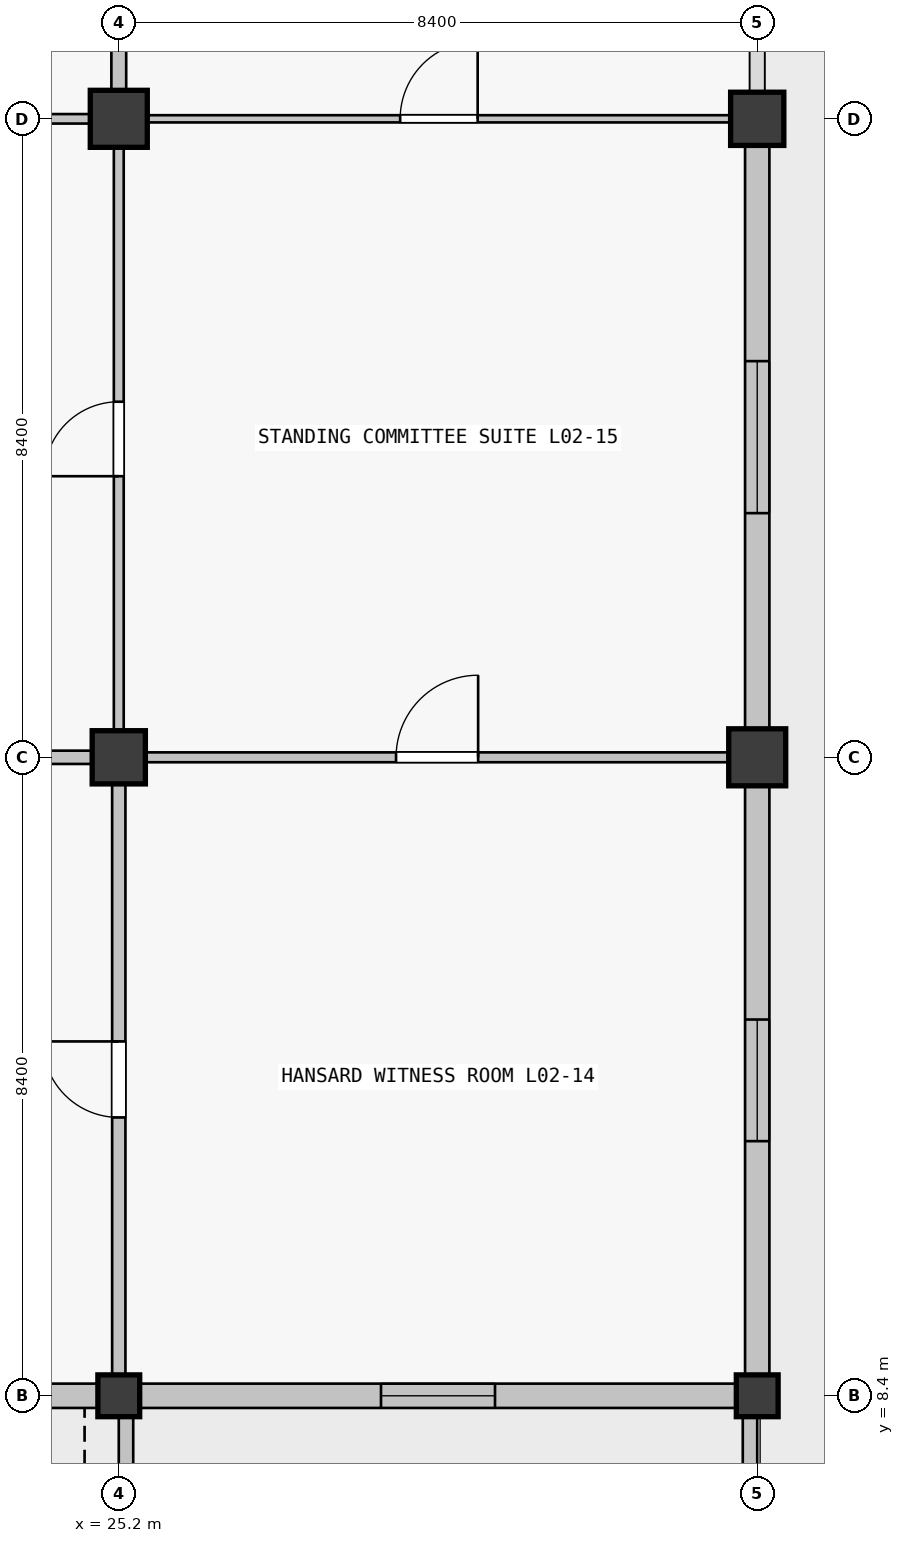
"""IFC4 building model, lengths in metres.
Left out: names, types, materials, properties, quantities, classifications, styles, units other than length and angle.
Written with IfcOpenShell. Run it as: python <this file> out.ifc"""

import sys

from ifc_helpers import new_model, si_unit, direction, frame, frame_2d, origin, origin_2d, place, context, subcontext, project, spatial, rectangle, extrude, element, fill, save


model = new_model("IFC4")
c1 = context("Model", 3, precision=1e-05, world=origin(), true_north=direction((0.0, 1.0)))
c2 = subcontext(c1, "Body", "Model", "MODEL_VIEW")
j1 = project(units=[si_unit("LENGTHUNIT", "METRE"), si_unit("PLANEANGLEUNIT", "RADIAN")], contexts=[c1])
p1 = place(None, origin())
s1 = spatial("IfcSite", under=j1, at=p1, CompositionType="ELEMENT")
p2 = place(p1, origin())
s2 = spatial("IfcBuilding", under=s1, at=p2, CompositionType="ELEMENT")
p3 = place(p2, frame((0.0, 0.0, 10.26)))
s3 = spatial("IfcBuildingStorey", under=s2, at=p3, CompositionType="ELEMENT", Elevation=10.26)
p4 = place(p3, frame((25.2, 8.4, 0.0), z_axis=(0.0, 0.0, 1.0), x_axis=(1.0, 0.0, 0.0)))
e1 = element("IfcColumn", 1, at=p4, inside=s3, PredefinedType="COLUMN", context=c2, shape_type="SweptSolid", body=[
    extrude(rectangle(XDim=0.55, YDim=0.55, at=origin_2d()), origin(), (0.0, 0.0, 1.0), 4.25),
])
p5 = place(p3, frame((25.2, 16.8, 0.0), z_axis=(0.0, 0.0, 1.0), x_axis=(1.0, 0.0, 0.0)))
e2 = element("IfcColumn", 2, at=p5, inside=s3, PredefinedType="COLUMN", context=c2, shape_type="SweptSolid", body=[
    extrude(rectangle(XDim=0.7, YDim=0.7, at=origin_2d()), origin(), (0.0, 0.0, 1.0), 4.5),
])
p6 = place(p3, frame((25.2, 25.2, 0.0), z_axis=(0.0, 0.0, 1.0), x_axis=(1.0, 0.0, 0.0)))
e3 = element("IfcColumn", 3, at=p6, inside=s3, PredefinedType="COLUMN", context=c2, shape_type="SweptSolid", body=[
    extrude(rectangle(XDim=0.75, YDim=0.75, at=origin_2d()), origin(), (0.0, 0.0, 1.0), 4.5),
])
p7 = place(p3, frame((33.6, 8.4, 0.0), z_axis=(0.0, 0.0, 1.0), x_axis=(1.0, 0.0, 0.0)))
e4 = element("IfcColumn", 4, at=p7, inside=s3, PredefinedType="COLUMN", context=c2, shape_type="SweptSolid", body=[
    extrude(rectangle(XDim=0.55, YDim=0.55, at=origin_2d()), origin(), (0.0, 0.0, 1.0), 4.25),
])
p8 = place(p3, frame((33.6, 16.8, 0.0), z_axis=(0.0, 0.0, 1.0), x_axis=(1.0, 0.0, 0.0)))
e5 = element("IfcColumn", 5, at=p8, inside=s3, PredefinedType="COLUMN", context=c2, shape_type="SweptSolid", body=[
    extrude(rectangle(XDim=0.75, YDim=0.75, at=origin_2d()), origin(), (0.0, 0.0, 1.0), 4.5),
])
p9 = place(p3, frame((33.6, 25.2, 0.0), z_axis=(0.0, 0.0, 1.0), x_axis=(1.0, 0.0, 0.0)))
e6 = element("IfcColumn", 6, at=p9, inside=s3, PredefinedType="COLUMN", context=c2, shape_type="SweptSolid", body=[
    extrude(rectangle(XDim=0.7, YDim=0.7, at=origin_2d()), origin(), (0.0, 0.0, 1.0), 4.5),
])
p10 = place(p3, frame((24.924, 8.4, 0.0), z_axis=(0.0, 0.0, 1.0), x_axis=(-1.0, 0.0, 0.0)))
e7 = element("IfcWall", 7, at=p10, inside=s3, PredefinedType="SOLIDWALL", context=c2, shape_type="SweptSolid", body=[
    extrude(rectangle(XDim=7.848, YDim=0.32, at=frame_2d((3.924, 0.0))), origin(), (0.0, 0.0, 1.0), 3.54),
])
p11 = place(p10, frame((3.099, 0.0, 0.0)))
e8 = element("IfcOpeningElement", 8, at=p11, cuts=e7, PredefinedType="OPENING", context=c2, shape_type="SweptSolid", body=[
    extrude(rectangle(XDim=1.65, YDim=2.2, at=frame_2d((0.825, 1.1))), frame((0.0, 0.16, 0.0), z_axis=(0.0, -1.0, 0.0), x_axis=(1.0, 0.0, 0.0)), (0.0, 0.0, 1.0), 0.32),
])
p12 = place(p3, frame((33.324, 8.4, 0.0), z_axis=(0.0, 0.0, 1.0), x_axis=(-1.0, 0.0, 0.0)))
e9 = element("IfcWall", 9, at=p12, inside=s3, PredefinedType="SOLIDWALL", context=c2, shape_type="SweptSolid", body=[
    extrude(rectangle(XDim=7.848, YDim=0.32, at=frame_2d((3.924, 0.0))), origin(), (0.0, 0.0, 1.0), 3.54),
])
p13 = place(p12, frame((3.174, 0.0, 0.9)))
e10 = element("IfcOpeningElement", 10, at=p13, cuts=e9, PredefinedType="OPENING", context=c2, shape_type="SweptSolid", body=[
    extrude(rectangle(XDim=1.5, YDim=1.8, at=frame_2d((0.75, 0.9))), frame((0.0, 0.16, 0.0), z_axis=(0.0, -1.0, 0.0), x_axis=(1.0, 0.0, 0.0)), (0.0, 0.0, 1.0), 0.32),
])
p14 = place(p3, frame((33.6, 16.424, 0.0), z_axis=(0.0, 0.0, 1.0), x_axis=(0.0, -1.0, 0.0)))
e11 = element("IfcWall", 11, at=p14, inside=s3, PredefinedType="SOLIDWALL", context=c2, shape_type="SweptSolid", body=[
    extrude(rectangle(XDim=7.748, YDim=0.32, at=frame_2d((3.874, 0.0))), origin(), (0.0, 0.0, 1.0), 3.54),
])
p15 = place(p14, frame((3.074, 0.0, 0.9)))
e12 = element("IfcOpeningElement", 12, at=p15, cuts=e11, PredefinedType="OPENING", context=c2, shape_type="SweptSolid", body=[
    extrude(rectangle(XDim=1.6, YDim=2.1, at=frame_2d((0.8, 1.05))), frame((0.0, 0.16, 0.0), z_axis=(0.0, -1.0, 0.0), x_axis=(1.0, 0.0, 0.0)), (0.0, 0.0, 1.0), 0.32),
])
p16 = place(p3, frame((33.6, 24.849, 0.0), z_axis=(0.0, 0.0, 1.0), x_axis=(0.0, -1.0, 0.0)))
e13 = element("IfcWall", 13, at=p16, inside=s3, PredefinedType="SOLIDWALL", context=c2, shape_type="SweptSolid", body=[
    extrude(rectangle(XDim=7.673, YDim=0.32, at=frame_2d((3.836, 0.0))), origin(), (0.0, 0.0, 1.0), 3.54),
])
p17 = place(p16, frame((2.837, 0.0, 0.9)))
e14 = element("IfcOpeningElement", 14, at=p17, cuts=e13, PredefinedType="OPENING", context=c2, shape_type="SweptSolid", body=[
    extrude(rectangle(XDim=2.0, YDim=2.1, at=frame_2d((1.0, 1.05))), frame((0.0, 0.16, 0.0), z_axis=(0.0, -1.0, 0.0), x_axis=(1.0, 0.0, 0.0)), (0.0, 0.0, 1.0), 0.32),
])
for number, where, z_axis, x_axis in (
    (15, (25.295, 0.26, 0.0), (0.0, 0.0, 1.0), (0.0, 1.0, 0.0)),
    (16, (33.505, 8.14, 0.0), (0.0, 0.0, 1.0), (0.0, -1.0, 0.0)),
):
    element("IfcWall", number, at=place(p3, frame(where, z_axis=z_axis, x_axis=x_axis)), inside=s3, PredefinedType="PARAPET", context=c2, shape_type="SweptSolid", body=[
        extrude(rectangle(XDim=7.88, YDim=0.19, at=frame_2d((3.94, 0.0))), origin(), (0.0, 0.0, 1.0), 0.95),
    ])
p18 = place(p3, frame((17.177, 16.8, 0.0), z_axis=(0.0, 0.0, 1.0), x_axis=(1.0, 0.0, 0.0)))
e17 = element("IfcWall", 17, at=p18, inside=s3, PredefinedType="PARTITIONING", context=c2, shape_type="SweptSolid", body=[
    extrude(rectangle(XDim=7.671, YDim=0.175, at=frame_2d((3.835, 0.0))), origin(), (0.0, 0.0, 1.0), 3.37),
])
p19 = place(p18, frame((3.371, 0.0, 0.0)))
e18 = element("IfcOpeningElement", 18, at=p19, cuts=e17, PredefinedType="OPENING", context=c2, shape_type="SweptSolid", body=[
    extrude(rectangle(XDim=0.93, YDim=2.12, at=frame_2d((0.465, 1.06))), frame((0.0, 0.087, 0.0), z_axis=(0.0, -1.0, 0.0), x_axis=(1.0, 0.0, 0.0)), (0.0, 0.0, 1.0), 0.175),
])
p20 = place(p3, frame((17.152, 25.2, 0.0), z_axis=(0.0, 0.0, 1.0), x_axis=(1.0, 0.0, 0.0)))
e19 = element("IfcWall", 19, at=p20, inside=s3, PredefinedType="PARTITIONING", context=c2, shape_type="SweptSolid", body=[
    extrude(rectangle(XDim=7.671, YDim=0.125, at=frame_2d((3.835, 0.0))), origin(), (0.0, 0.0, 1.0), 3.37),
])
p21 = place(p20, frame((3.306, 0.0, 0.0)))
e20 = element("IfcOpeningElement", 20, at=p21, cuts=e19, PredefinedType="OPENING", context=c2, shape_type="SweptSolid", body=[
    extrude(rectangle(XDim=1.06, YDim=2.25, at=frame_2d((0.53, 1.125))), frame((0.0, 0.062, 0.0), z_axis=(0.0, -1.0, 0.0), x_axis=(1.0, 0.0, 0.0)), (0.0, 0.0, 1.0), 0.125),
])
p22 = place(p3, frame((25.552, 16.8, 0.0), z_axis=(0.0, 0.0, 1.0), x_axis=(1.0, 0.0, 0.0)))
e21 = element("IfcWall", 21, at=p22, inside=s3, PredefinedType="MOVABLE", context=c2, shape_type="SweptSolid", body=[
    extrude(rectangle(XDim=7.671, YDim=0.13, at=frame_2d((3.835, 0.0))), origin(), (0.0, 0.0, 1.0), 3.37),
])
p23 = place(p22, frame((3.296, 0.0, 0.0)))
e22 = element("IfcOpeningElement", 22, at=p23, cuts=e21, PredefinedType="OPENING", context=c2, shape_type="SweptSolid", body=[
    extrude(rectangle(XDim=1.08, YDim=2.25, at=frame_2d((0.54, 1.125))), frame((0.0, 0.065, 0.0), z_axis=(0.0, -1.0, 0.0), x_axis=(1.0, 0.0, 0.0)), (0.0, 0.0, 1.0), 0.13),
])
p24 = place(p3, frame((25.577, 25.2, 0.0), z_axis=(0.0, 0.0, 1.0), x_axis=(1.0, 0.0, 0.0)))
e23 = element("IfcWall", 23, at=p24, inside=s3, PredefinedType="PARTITIONING", context=c2, shape_type="SweptSolid", body=[
    extrude(rectangle(XDim=7.671, YDim=0.095, at=frame_2d((3.835, 0.0))), origin(), (0.0, 0.0, 1.0), 3.37),
])
p25 = place(p24, frame((3.325, 0.0, 0.0)))
e24 = element("IfcOpeningElement", 24, at=p25, cuts=e23, PredefinedType="OPENING", context=c2, shape_type="SweptSolid", body=[
    extrude(rectangle(XDim=1.02, YDim=2.2, at=frame_2d((0.51, 1.1))), frame((0.0, 0.047, 0.0), z_axis=(0.0, -1.0, 0.0), x_axis=(1.0, 0.0, 0.0)), (0.0, 0.0, 1.0), 0.095),
])
p26 = place(p3, frame((25.2, 8.677, 0.0), z_axis=(0.0, 0.0, 1.0), x_axis=(0.0, 1.0, 0.0)))
e25 = element("IfcWall", 25, at=p26, inside=s3, PredefinedType="PARTITIONING", context=c2, shape_type="SweptSolid", body=[
    extrude(rectangle(XDim=7.771, YDim=0.175, at=frame_2d((3.885, 0.0))), origin(), (0.0, 0.0, 1.0), 3.37),
])
p27 = place(p26, frame((3.385, 0.0, 0.0)))
e26 = element("IfcOpeningElement", 26, at=p27, cuts=e25, PredefinedType="OPENING", context=c2, shape_type="SweptSolid", body=[
    extrude(rectangle(XDim=1.0, YDim=2.2, at=frame_2d((0.5, 1.1))), frame((0.0, 0.087, 0.0), z_axis=(0.0, -1.0, 0.0), x_axis=(1.0, 0.0, 0.0)), (0.0, 0.0, 1.0), 0.175),
])
p28 = place(p3, frame((25.2, 17.152, 0.0), z_axis=(0.0, 0.0, 1.0), x_axis=(0.0, 1.0, 0.0)))
e27 = element("IfcWall", 27, at=p28, inside=s3, PredefinedType="MOVABLE", context=c2, shape_type="SweptSolid", body=[
    extrude(rectangle(XDim=7.671, YDim=0.13, at=frame_2d((3.835, 0.0))), origin(), (0.0, 0.0, 1.0), 3.37),
])
p29 = place(p28, frame((3.346, 0.0, 0.0)))
e28 = element("IfcOpeningElement", 28, at=p29, cuts=e27, PredefinedType="OPENING", context=c2, shape_type="SweptSolid", body=[
    extrude(rectangle(XDim=0.98, YDim=2.18, at=frame_2d((0.49, 1.09))), frame((0.0, 0.065, 0.0), z_axis=(0.0, -1.0, 0.0), x_axis=(1.0, 0.0, 0.0)), (0.0, 0.0, 1.0), 0.13),
])
p30 = place(p3, frame((25.2, 25.577, 0.0), z_axis=(0.0, 0.0, 1.0), x_axis=(0.0, 1.0, 0.0)))
e29 = element("IfcWall", 29, at=p30, inside=s3, PredefinedType="PARTITIONING", context=c2, shape_type="SweptSolid", body=[
    extrude(rectangle(XDim=7.671, YDim=0.195, at=frame_2d((3.835, 0.0))), origin(), (0.0, 0.0, 1.0), 3.37),
])
p31 = place(p30, frame((3.371, 0.0, 0.0)))
e30 = element("IfcOpeningElement", 30, at=p31, cuts=e29, PredefinedType="OPENING", context=c2, shape_type="SweptSolid", body=[
    extrude(rectangle(XDim=0.93, YDim=2.12, at=frame_2d((0.465, 1.06))), frame((0.0, 0.098, 0.0), z_axis=(0.0, -1.0, 0.0), x_axis=(1.0, 0.0, 0.0)), (0.0, 0.0, 1.0), 0.195),
])
p32 = place(p13, origin())
e31 = element("IfcWindow", 31, at=p32, inside=s3, PartitioningType="SINGLE_PANEL", PredefinedType="WINDOW", context=c2, shape_type="SweptSolid", body=[
    extrude(rectangle(XDim=1.5, YDim=1.8, at=frame_2d((0.75, 0.9))), frame((0.0, 0.03, 0.0), z_axis=(0.0, -1.0, 0.0), x_axis=(1.0, 0.0, 0.0)), (0.0, 0.0, 1.0), 0.06),
])
fill(e10, e31)
p33 = place(p15, origin())
e32 = element("IfcWindow", 32, at=p33, inside=s3, PartitioningType="SINGLE_PANEL", PredefinedType="WINDOW", context=c2, shape_type="SweptSolid", body=[
    extrude(rectangle(XDim=1.6, YDim=2.1, at=frame_2d((0.8, 1.05))), frame((0.0, 0.03, 0.0), z_axis=(0.0, -1.0, 0.0), x_axis=(1.0, 0.0, 0.0)), (0.0, 0.0, 1.0), 0.06),
])
fill(e12, e32)
p34 = place(p17, origin())
e33 = element("IfcWindow", 33, at=p34, inside=s3, PartitioningType="SINGLE_PANEL", PredefinedType="WINDOW", context=c2, shape_type="SweptSolid", body=[
    extrude(rectangle(XDim=2.0, YDim=2.1, at=frame_2d((1.0, 1.05))), frame((0.0, 0.03, 0.0), z_axis=(0.0, -1.0, 0.0), x_axis=(1.0, 0.0, 0.0)), (0.0, 0.0, 1.0), 0.06),
])
fill(e14, e33)
p35 = place(p23, origin())
e34 = element("IfcDoor", 34, at=p35, inside=s3, OperationType="SINGLE_SWING_RIGHT", PredefinedType="DOOR", context=c2, shape_type="SweptSolid", body=[
    extrude(rectangle(XDim=1.08, YDim=2.25, at=frame_2d((0.54, 1.125))), frame((0.0, 0.025, 0.0), z_axis=(0.0, -1.0, 0.0), x_axis=(1.0, 0.0, 0.0)), (0.0, 0.0, 1.0), 0.05),
])
fill(e22, e34)
p36 = place(p25, origin())
e35 = element("IfcDoor", 35, at=p36, inside=s3, OperationType="SINGLE_SWING_RIGHT", PredefinedType="DOOR", context=c2, shape_type="SweptSolid", body=[
    extrude(rectangle(XDim=1.02, YDim=2.2, at=frame_2d((0.51, 1.1))), frame((0.0, 0.025, 0.0), z_axis=(0.0, -1.0, 0.0), x_axis=(1.0, 0.0, 0.0)), (0.0, 0.0, 1.0), 0.05),
])
fill(e24, e35)
p37 = place(p27, origin())
e36 = element("IfcDoor", 36, at=p37, inside=s3, OperationType="SINGLE_SWING_RIGHT", PredefinedType="DOOR", context=c2, shape_type="SweptSolid", body=[
    extrude(rectangle(XDim=1.0, YDim=2.2, at=frame_2d((0.5, 1.1))), frame((0.0, 0.025, 0.0), z_axis=(0.0, -1.0, 0.0), x_axis=(1.0, 0.0, 0.0)), (0.0, 0.0, 1.0), 0.05),
])
fill(e26, e36)
p38 = place(p29, origin())
e37 = element("IfcDoor", 37, at=p38, inside=s3, OperationType="SINGLE_SWING_LEFT", PredefinedType="DOOR", context=c2, shape_type="SweptSolid", body=[
    extrude(rectangle(XDim=0.98, YDim=2.18, at=frame_2d((0.49, 1.09))), frame((0.0, 0.025, 0.0), z_axis=(0.0, -1.0, 0.0), x_axis=(1.0, 0.0, 0.0)), (0.0, 0.0, 1.0), 0.05),
])
fill(e28, e37)
save(model, sys.argv[1])
